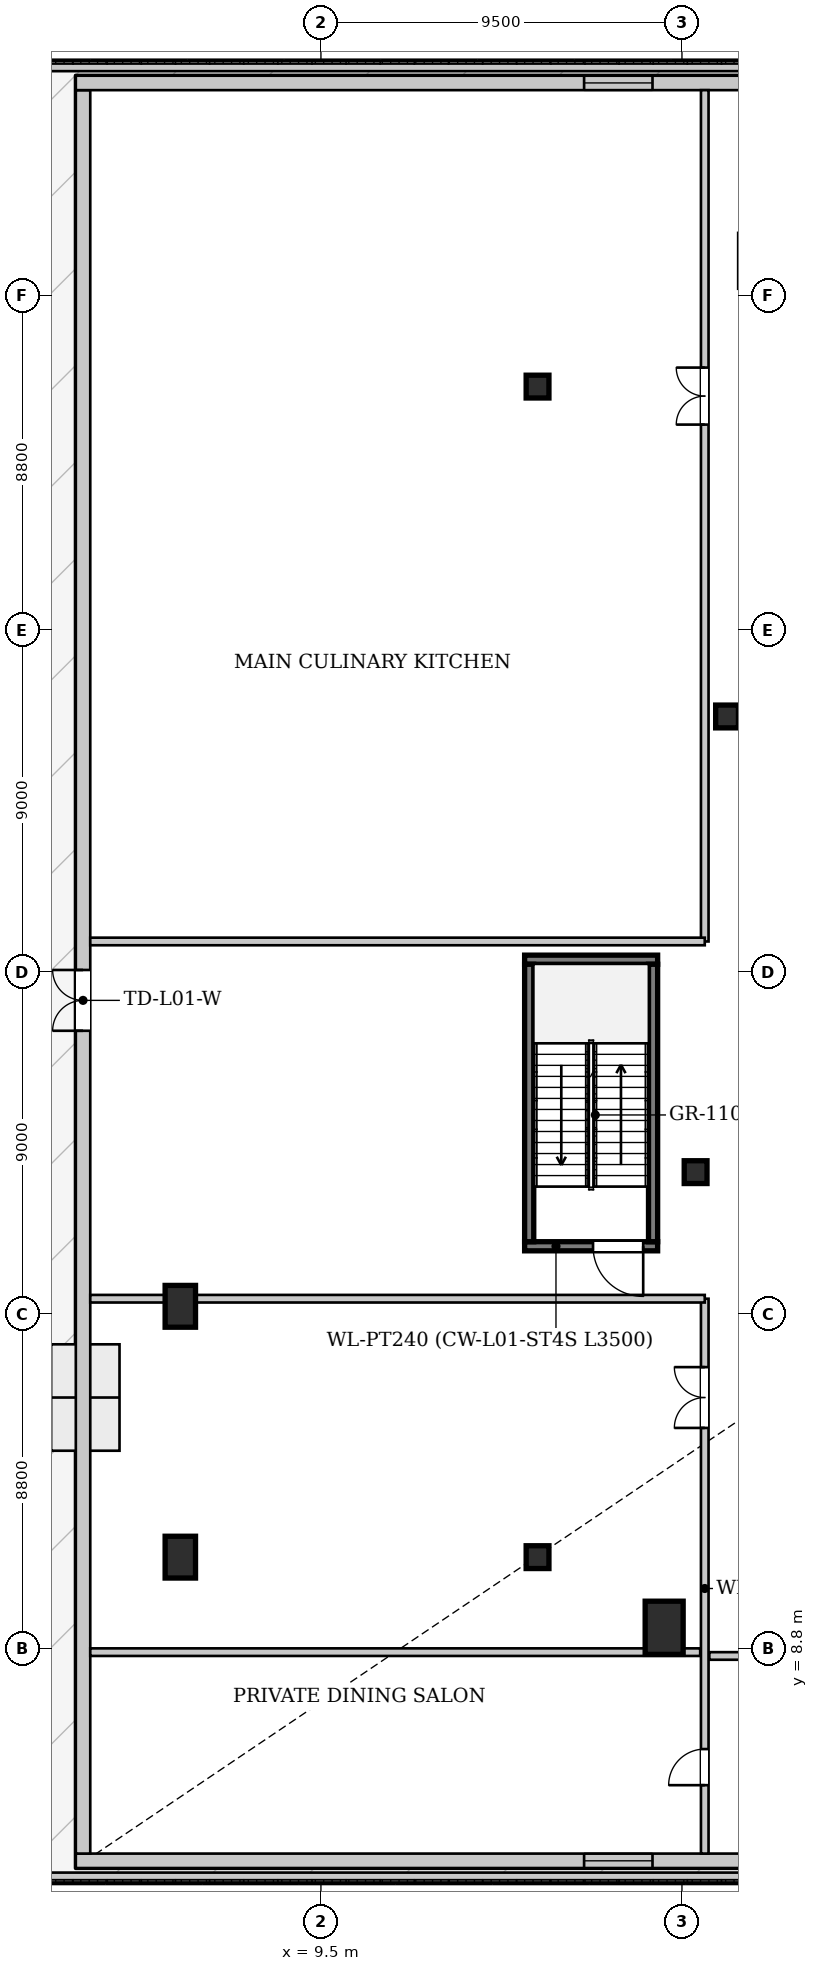
"""IFC4 building model, lengths in metres.
Left out: names, types, materials, properties, quantities, classifications, styles, units other than length and angle.
Written with IfcOpenShell. Run it as: python <this file> out.ifc"""

import sys

from ifc_helpers import new_model, si_unit, direction, frame, frame_2d, origin, origin_2d, place, context, subcontext, project, spatial, rectangle, hollow_rectangle, extrude, source, transform, mapped, element, fill, save


model = new_model("IFC4")
c1 = context("Model", 3, precision=1e-05, world=origin(), true_north=direction((0.0, 1.0)))
c2 = subcontext(c1, "Body", "Model", "MODEL_VIEW")
j1 = project(units=[si_unit("LENGTHUNIT", "METRE"), si_unit("PLANEANGLEUNIT", "RADIAN")], contexts=[c1])
p1 = place(None, origin())
s1 = spatial("IfcSite", under=j1, at=p1, CompositionType="ELEMENT")
p2 = place(p1, origin())
s2 = spatial("IfcBuilding", under=s1, at=p2, CompositionType="ELEMENT")
p3 = place(p2, frame((0.0, 0.0, 5.4)))
s3 = spatial("IfcBuildingStorey", under=s2, at=p3, CompositionType="ELEMENT", Elevation=5.4)
m1 = source(origin(), c2, "Body", "SweptSolid", [
    extrude(rectangle(XDim=1.0, YDim=1.4, at=origin_2d()), origin(), (0.0, 0.0, 1.0), 4.635),
])
p4 = place(p3, frame((18.532, 9.341, 0.0), z_axis=(0.0, 0.0, 1.0), x_axis=(1.0, 0.0, 0.0)))
e1 = element("IfcColumn", 1, at=p4, inside=s3, PredefinedType="COLUMN", context=c2, shape_type="MappedRepresentation", body=[
    mapped(m1, transform((0.0, 0.0, 0.0), x_axis=(1.0, 0.0, 0.0), y_axis=(0.0, 1.0, 0.0), z_axis=(0.0, 0.0, 1.0), scale=1.0)),
])
m2 = source(origin(), c2, "Body", "SweptSolid", [
    extrude(hollow_rectangle(XDim=0.6, YDim=0.6, WallThickness=0.035, at=origin_2d()), origin(), (0.0, 0.0, 1.0), 4.635),
])
for number, where, z_axis, x_axis in (
    (2, (15.2, 11.2, 0.0), (0.0, 0.0, 1.0), (1.0, 0.0, 0.0)),
    (3, (15.2, 42.0, 0.0), (0.0, 0.0, 1.0), (1.0, 0.0, 0.0)),
    (4, (20.187, 33.32, 0.0), (0.0, 0.0, 1.0), (1.0, 0.0, 0.0)),
    (5, (19.359, 21.331, 0.0), (0.0, 0.0, 1.0), (1.0, 0.0, 0.0)),
):
    element("IfcColumn", number, at=place(p3, frame(where, z_axis=z_axis, x_axis=x_axis)), inside=s3, PredefinedType="COLUMN", context=c2, shape_type="MappedRepresentation", body=[
        mapped(m2, transform((0.0, 0.0, 0.0), x_axis=(1.0, 0.0, 0.0), y_axis=(0.0, 1.0, 0.0), z_axis=(0.0, 0.0, 1.0), scale=1.0)),
    ])
m3 = source(origin(), c2, "Body", "SweptSolid", [
    extrude(rectangle(XDim=0.8, YDim=1.1, at=origin_2d()), origin(), (0.0, 0.0, 1.0), 4.635),
])
for number, where, z_axis, x_axis in (
    (6, (5.8, 11.2, 0.0), (0.0, 0.0, 1.0), (1.0, 0.0, 0.0)),
    (7, (5.8, 17.8, 0.0), (0.0, 0.0, 1.0), (1.0, 0.0, 0.0)),
):
    element("IfcColumn", number, at=place(p3, frame(where, z_axis=z_axis, x_axis=x_axis)), inside=s3, PredefinedType="COLUMN", context=c2, shape_type="MappedRepresentation", body=[
        mapped(m3, transform((0.0, 0.0, 0.0), x_axis=(1.0, 0.0, 0.0), y_axis=(0.0, 1.0, 0.0), z_axis=(0.0, 0.0, 1.0), scale=1.0)),
    ])
p5 = place(p3, frame((34.8, 3.21, 0.0), z_axis=(0.0, 0.0, 1.0), x_axis=(-1.0, 0.0, 0.0)))
e8 = element("IfcWall", 8, at=p5, inside=s3, PredefinedType="SOLIDWALL", context=c2, shape_type="SweptSolid", body=[
    extrude(rectangle(XDim=31.75, YDim=0.38, at=frame_2d((15.875, 0.0))), origin(), (0.0, 0.0, 1.0), 3.872),
])
p6 = place(p5, frame((16.575, 0.0, 0.85)))
e9 = element("IfcOpeningElement", 9, at=p6, cuts=e8, PredefinedType="OPENING", context=c2, shape_type="SweptSolid", body=[
    extrude(rectangle(XDim=1.8, YDim=2.4, at=frame_2d((0.9, 1.2))), frame((0.0, 0.2, 0.0), z_axis=(0.0, -1.0, 0.0), x_axis=(1.0, 0.0, 0.0)), (0.0, 0.0, 1.0), 0.4),
])
p7 = place(p3, frame((3.24, 3.4, 0.0), z_axis=(0.0, 0.0, 1.0), x_axis=(0.0, 1.0, 0.0)))
e10 = element("IfcWall", 10, at=p7, inside=s3, PredefinedType="SOLIDWALL", context=c2, shape_type="SweptSolid", body=[
    extrude(rectangle(XDim=46.4, YDim=0.38, at=frame_2d((23.2, 0.0))), origin(), (0.0, 0.0, 1.0), 3.872),
])
p8 = place(p7, frame((21.65, 0.0, 0.0)))
e11 = element("IfcOpeningElement", 11, at=p8, cuts=e10, PredefinedType="OPENING", context=c2, shape_type="SweptSolid", body=[
    extrude(rectangle(XDim=1.6, YDim=2.3, at=frame_2d((0.8, 1.15))), frame((0.0, 0.2, 0.0), z_axis=(0.0, -1.0, 0.0), x_axis=(1.0, 0.0, 0.0)), (0.0, 0.0, 1.0), 0.4),
])
p9 = place(p3, frame((3.05, 49.99, 0.0), z_axis=(0.0, 0.0, 1.0), x_axis=(1.0, 0.0, 0.0)))
e12 = element("IfcWall", 12, at=p9, inside=s3, PredefinedType="SOLIDWALL", context=c2, shape_type="SweptSolid", body=[
    extrude(rectangle(XDim=31.75, YDim=0.38, at=frame_2d((15.875, 0.0))), origin(), (0.0, 0.0, 1.0), 3.872),
])
p10 = place(p9, frame((13.375, 0.0, 0.85)))
e13 = element("IfcOpeningElement", 13, at=p10, cuts=e12, PredefinedType="OPENING", context=c2, shape_type="SweptSolid", body=[
    extrude(rectangle(XDim=1.8, YDim=2.4, at=frame_2d((0.9, 1.2))), frame((0.0, 0.2, 0.0), z_axis=(0.0, -1.0, 0.0), x_axis=(1.0, 0.0, 0.0)), (0.0, 0.0, 1.0), 0.4),
])
for number, where, z_axis, x_axis in (
    (14, (2.2, 2.76, 0.0), (0.0, 0.0, 1.0), (1.0, 0.0, 0.0)),
    (15, (2.2, 50.44, 0.0), (0.0, 0.0, 1.0), (1.0, 0.0, 0.0)),
):
    element("IfcWall", number, at=place(p3, frame(where, z_axis=z_axis, x_axis=x_axis)), inside=s3, PredefinedType="PARAPET", context=c2, shape_type="SweptSolid", body=[
        extrude(rectangle(XDim=71.6, YDim=0.28, at=frame_2d((35.8, 0.0))), origin(), (0.0, 0.0, 1.0), 0.45),
    ])
p11 = place(p3, frame((18.36, 19.38, 0.0), z_axis=(0.0, 0.0, 1.0), x_axis=(-1.0, 0.0, 0.0)))
e16 = element("IfcWall", 16, at=p11, inside=s3, PredefinedType="PARTITIONING", context=c2, shape_type="SweptSolid", body=[
    extrude(rectangle(XDim=3.5, YDim=0.24, at=frame_2d((1.75, 0.0))), origin(), (0.0, 0.0, 1.0), 4.48),
])
p12 = place(p11, frame((0.38, 0.0, 0.0)))
e17 = element("IfcOpeningElement", 17, at=p12, cuts=e16, PredefinedType="OPENING", context=c2, shape_type="SweptSolid", body=[
    extrude(rectangle(XDim=1.32, YDim=2.2, at=frame_2d((0.66, 1.1))), frame((0.0, 0.13, 0.0), z_axis=(0.0, -1.0, 0.0), x_axis=(1.0, 0.0, 0.0)), (0.0, 0.0, 1.0), 0.26),
])
p13 = place(p3, frame((14.86, 26.92, 0.0), z_axis=(0.0, 0.0, 1.0), x_axis=(1.0, 0.0, 0.0)))
e18 = element("IfcWall", 18, at=p13, inside=s3, PredefinedType="PARTITIONING", context=c2, shape_type="SweptSolid", body=[
    extrude(rectangle(XDim=3.5, YDim=0.24, at=frame_2d((1.75, 0.0))), origin(), (0.0, 0.0, 1.0), 4.48),
])
for number, where, z_axis, x_axis in (
    (19, (14.98, 19.5, 0.0), (0.0, 0.0, 1.0), (0.0, 1.0, 0.0)),
    (20, (18.24, 26.8, 0.0), (0.0, 0.0, 1.0), (0.0, -1.0, 0.0)),
):
    element("IfcWall", number, at=place(p3, frame(where, z_axis=z_axis, x_axis=x_axis)), inside=s3, PredefinedType="PARTITIONING", context=c2, shape_type="SweptSolid", body=[
        extrude(rectangle(XDim=7.3, YDim=0.24, at=frame_2d((3.65, 0.0))), origin(), (0.0, 0.0, 1.0), 4.48),
    ])
p14 = place(p3, frame((19.6, 3.4, 0.0), z_axis=(0.0, 0.0, 1.0), x_axis=(0.0, 1.0, 0.0)))
e21 = element("IfcWall", 21, at=p14, inside=s3, PredefinedType="PARTITIONING", context=c2, shape_type="SweptSolid", body=[
    extrude(rectangle(XDim=14.6, YDim=0.2, at=frame_2d((7.3, 0.0))), origin(), (0.0, 0.0, 1.0), 3.83),
])
p15 = place(p14, frame((1.8, 0.0, 0.0)))
e22 = element("IfcOpeningElement", 22, at=p15, cuts=e21, PredefinedType="OPENING", context=c2, shape_type="SweptSolid", body=[
    extrude(rectangle(XDim=0.95, YDim=2.1, at=frame_2d((0.475, 1.05))), frame((0.0, 0.11, 0.0), z_axis=(0.0, -1.0, 0.0), x_axis=(1.0, 0.0, 0.0)), (0.0, 0.0, 1.0), 0.22),
])
p16 = place(p14, frame((11.2, 0.0, 0.0)))
e23 = element("IfcOpeningElement", 23, at=p16, cuts=e21, PredefinedType="OPENING", context=c2, shape_type="SweptSolid", body=[
    extrude(rectangle(XDim=1.6, YDim=2.2, at=frame_2d((0.8, 1.1))), frame((0.0, 0.11, 0.0), z_axis=(0.0, -1.0, 0.0), x_axis=(1.0, 0.0, 0.0)), (0.0, 0.0, 1.0), 0.22),
])
p17 = place(p3, frame((3.43, 8.7, 0.0), z_axis=(0.0, 0.0, 1.0), x_axis=(1.0, 0.0, 0.0)))
e24 = element("IfcWall", 24, at=p17, inside=s3, PredefinedType="PARTITIONING", context=c2, shape_type="SweptSolid", body=[
    extrude(rectangle(XDim=16.05, YDim=0.2, at=frame_2d((8.025, 0.0))), origin(), (0.0, 0.0, 1.0), 3.83),
])
p18 = place(p3, frame((3.43, 18.0, 0.0), z_axis=(0.0, 0.0, 1.0), x_axis=(1.0, 0.0, 0.0)))
e25 = element("IfcWall", 25, at=p18, inside=s3, PredefinedType="PARTITIONING", context=c2, shape_type="SweptSolid", body=[
    extrude(rectangle(XDim=16.17, YDim=0.2, at=frame_2d((8.085, 0.0))), origin(), (0.0, 0.0, 1.0), 3.83),
])
p19 = place(p3, frame((19.6, 27.4, 0.0), z_axis=(0.0, 0.0, 1.0), x_axis=(0.0, 1.0, 0.0)))
e26 = element("IfcWall", 26, at=p19, inside=s3, PredefinedType="PARTITIONING", context=c2, shape_type="SweptSolid", body=[
    extrude(rectangle(XDim=22.4, YDim=0.2, at=frame_2d((11.2, 0.0))), origin(), (0.0, 0.0, 1.0), 3.83),
])
p20 = place(p19, frame((13.6, 0.0, 0.0)))
e27 = element("IfcOpeningElement", 27, at=p20, cuts=e26, PredefinedType="OPENING", context=c2, shape_type="SweptSolid", body=[
    extrude(rectangle(XDim=1.5, YDim=2.25, at=frame_2d((0.75, 1.125))), frame((0.0, 0.11, 0.0), z_axis=(0.0, -1.0, 0.0), x_axis=(1.0, 0.0, 0.0)), (0.0, 0.0, 1.0), 0.22),
])
p21 = place(p3, frame((3.43, 27.4, 0.0), z_axis=(0.0, 0.0, 1.0), x_axis=(1.0, 0.0, 0.0)))
e28 = element("IfcWall", 28, at=p21, inside=s3, PredefinedType="PARTITIONING", context=c2, shape_type="SweptSolid", body=[
    extrude(rectangle(XDim=16.17, YDim=0.2, at=frame_2d((8.085, 0.0))), origin(), (0.0, 0.0, 1.0), 3.83),
])
p22 = place(p3, frame((19.72, 8.6, 0.0), z_axis=(0.0, 0.0, 1.0), x_axis=(1.0, 0.0, 0.0)))
e29 = element("IfcWall", 29, at=p22, inside=s3, PredefinedType="PARTITIONING", context=c2, shape_type="SweptSolid", body=[
    extrude(rectangle(XDim=34.76, YDim=0.2, at=frame_2d((17.38, 0.0))), origin(), (0.0, 0.0, 1.0), 3.83),
])
p23 = place(p22, frame((12.45, 0.0, 0.0)))
e30 = element("IfcOpeningElement", 30, at=p23, cuts=e29, PredefinedType="OPENING", context=c2, shape_type="SweptSolid", body=[
    extrude(rectangle(XDim=1.6, YDim=2.2, at=frame_2d((0.8, 1.1))), frame((0.0, 0.11, 0.0), z_axis=(0.0, -1.0, 0.0), x_axis=(1.0, 0.0, 0.0)), (0.0, 0.0, 1.0), 0.22),
])
m4 = source(origin(), c2, "Body", "SweptSolid", [
    extrude(rectangle(XDim=1.6, YDim=2.3, at=frame_2d((0.8, 1.15))), frame((0.0, 0.025, 0.0), z_axis=(0.0, -1.0, 0.0), x_axis=(1.0, 0.0, 0.0)), (0.0, 0.0, 1.0), 0.05),
])
p24 = place(p8, origin())
e31 = element("IfcDoor", 31, at=p24, inside=s3, OperationType="DOUBLE_DOOR_SINGLE_SWING", PredefinedType="DOOR", context=c2, shape_type="MappedRepresentation", body=[
    mapped(m4, transform((0.0, 0.0, 0.0), x_axis=(1.0, 0.0, 0.0), y_axis=(0.0, 1.0, 0.0), z_axis=(0.0, 0.0, 1.0), scale=1.0)),
])
fill(e11, e31)
m5 = source(origin(), c2, "Body", "SweptSolid", [
    extrude(rectangle(XDim=1.8, YDim=2.4, at=frame_2d((0.9, 1.2))), frame((0.0, 0.03, 0.0), z_axis=(0.0, -1.0, 0.0), x_axis=(1.0, 0.0, 0.0)), (0.0, 0.0, 1.0), 0.06),
])
p25 = place(p6, origin())
e32 = element("IfcWindow", 32, at=p25, inside=s3, PartitioningType="SINGLE_PANEL", PredefinedType="WINDOW", context=c2, shape_type="MappedRepresentation", body=[
    mapped(m5, transform((0.0, 0.0, 0.0), x_axis=(1.0, 0.0, 0.0), y_axis=(0.0, 1.0, 0.0), z_axis=(0.0, 0.0, 1.0), scale=1.0)),
])
fill(e9, e32)
p26 = place(p10, origin())
e33 = element("IfcWindow", 33, at=p26, inside=s3, PartitioningType="SINGLE_PANEL", PredefinedType="WINDOW", context=c2, shape_type="MappedRepresentation", body=[
    mapped(m5, transform((0.0, 0.0, 0.0), x_axis=(1.0, 0.0, 0.0), y_axis=(0.0, 1.0, 0.0), z_axis=(0.0, 0.0, 1.0), scale=1.0)),
])
fill(e13, e33)
m6 = source(origin(), c2, "Body", "SweptSolid", [
    extrude(rectangle(XDim=1.32, YDim=2.2, at=frame_2d((0.66, 1.1))), frame((0.0, 0.025, 0.0), z_axis=(0.0, -1.0, 0.0), x_axis=(1.0, 0.0, 0.0)), (0.0, 0.0, 1.0), 0.05),
])
p27 = place(p12, origin())
e34 = element("IfcDoor", 34, at=p27, inside=s3, OperationType="SINGLE_SWING_LEFT", PredefinedType="DOOR", context=c2, shape_type="MappedRepresentation", body=[
    mapped(m6, transform((0.0, 0.0, 0.0), x_axis=(1.0, 0.0, 0.0), y_axis=(0.0, 1.0, 0.0), z_axis=(0.0, 0.0, 1.0), scale=1.0)),
])
fill(e17, e34)
m7 = source(origin(), c2, "Body", "SweptSolid", [
    extrude(rectangle(XDim=0.95, YDim=2.1, at=frame_2d((0.475, 1.05))), frame((0.0, 0.025, 0.0), z_axis=(0.0, -1.0, 0.0), x_axis=(1.0, 0.0, 0.0)), (0.0, 0.0, 1.0), 0.05),
])
p28 = place(p15, origin())
e35 = element("IfcDoor", 35, at=p28, inside=s3, OperationType="SINGLE_SWING_LEFT", PredefinedType="DOOR", context=c2, shape_type="MappedRepresentation", body=[
    mapped(m7, transform((0.0, 0.0, 0.0), x_axis=(1.0, 0.0, 0.0), y_axis=(0.0, 1.0, 0.0), z_axis=(0.0, 0.0, 1.0), scale=1.0)),
])
fill(e22, e35)
m8 = source(origin(), c2, "Body", "SweptSolid", [
    extrude(rectangle(XDim=1.6, YDim=2.2, at=frame_2d((0.8, 1.1))), frame((0.0, 0.025, 0.0), z_axis=(0.0, -1.0, 0.0), x_axis=(1.0, 0.0, 0.0)), (0.0, 0.0, 1.0), 0.05),
])
p29 = place(p16, origin())
e36 = element("IfcDoor", 36, at=p29, inside=s3, OperationType="DOUBLE_DOOR_SINGLE_SWING", PredefinedType="DOOR", context=c2, shape_type="MappedRepresentation", body=[
    mapped(m8, transform((0.0, 0.0, 0.0), x_axis=(1.0, 0.0, 0.0), y_axis=(0.0, 1.0, 0.0), z_axis=(0.0, 0.0, 1.0), scale=1.0)),
])
fill(e23, e36)
m9 = source(origin(), c2, "Body", "SweptSolid", [
    extrude(rectangle(XDim=1.5, YDim=2.25, at=frame_2d((0.75, 1.125))), frame((0.0, 0.025, 0.0), z_axis=(0.0, -1.0, 0.0), x_axis=(1.0, 0.0, 0.0)), (0.0, 0.0, 1.0), 0.05),
])
p30 = place(p20, origin())
e37 = element("IfcDoor", 37, at=p30, inside=s3, OperationType="DOUBLE_DOOR_SINGLE_SWING", PredefinedType="DOOR", context=c2, shape_type="MappedRepresentation", body=[
    mapped(m9, transform((0.0, 0.0, 0.0), x_axis=(1.0, 0.0, 0.0), y_axis=(0.0, 1.0, 0.0), z_axis=(0.0, 0.0, 1.0), scale=1.0)),
])
fill(e27, e37)
save(model, sys.argv[1])
